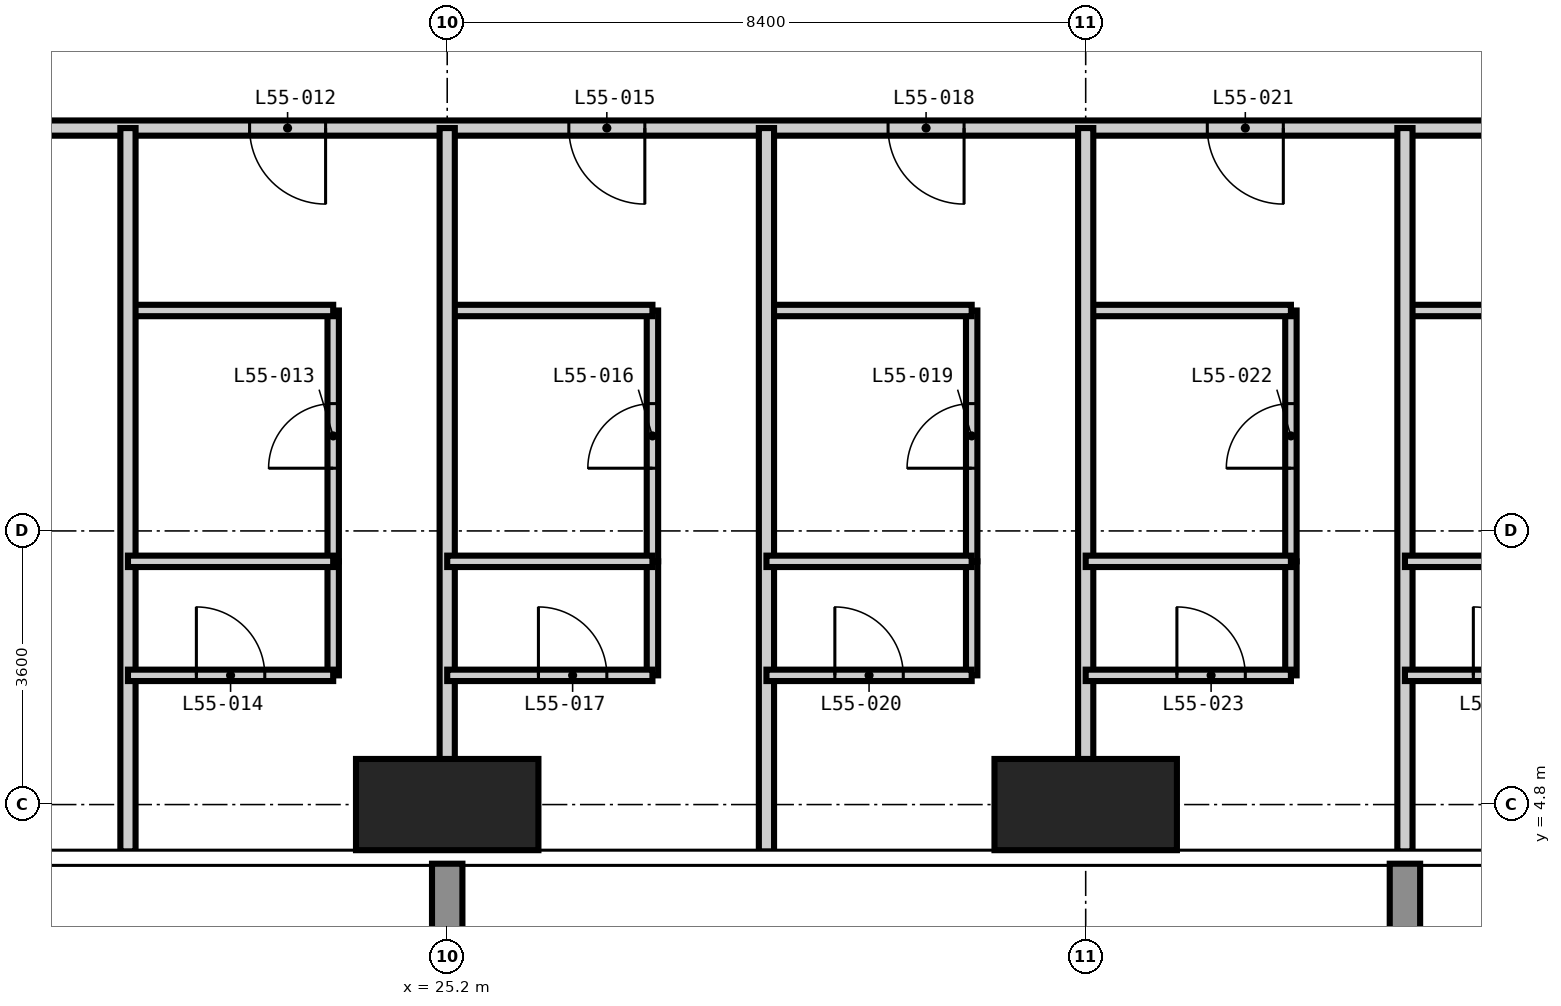
"""IFC4 building model, lengths in metres.
Left out: names, types, materials, properties, quantities, classifications, styles, units other than length and angle.
Written with IfcOpenShell. Run it as: python <this file> out.ifc"""

import sys

from ifc_helpers import new_model, si_unit, direction, frame, frame_2d, origin, origin_2d, place, context, subcontext, project, spatial, rectangle, extrude, element, fill, save


model = new_model("IFC4")
c1 = context("Model", 3, precision=1e-05, world=origin(), true_north=direction((0.0, 1.0)))
c2 = subcontext(c1, "Body", "Model", "MODEL_VIEW")
j1 = project(units=[si_unit("LENGTHUNIT", "METRE"), si_unit("PLANEANGLEUNIT", "RADIAN")], contexts=[c1])
p1 = place(None, origin())
s1 = spatial("IfcSite", under=j1, at=p1, CompositionType="ELEMENT")
p2 = place(p1, origin())
s2 = spatial("IfcBuilding", under=s1, at=p2, CompositionType="ELEMENT")
p3 = place(p2, frame((0.0, 0.0, 213.0)))
s3 = spatial("IfcBuildingStorey", under=s2, at=p3, CompositionType="ELEMENT", Elevation=213.0)
for number, where, z_axis, x_axis in (
    (1, (25.2, 4.8, -0.35), (0.0, 0.0, 1.0), (1.0, 0.0, 0.0)),
    (2, (33.6, 4.8, -0.35), (0.0, 0.0, 1.0), (1.0, 0.0, 0.0)),
):
    element("IfcColumn", number, at=place(p3, frame(where, z_axis=z_axis, x_axis=x_axis)), inside=s3, PredefinedType="COLUMN", context=c2, shape_type="SweptSolid", body=[
        extrude(rectangle(XDim=2.4, YDim=1.2, at=origin_2d()), origin(), (0.0, 0.0, 1.0), 3.6),
    ])
p4 = place(p3, frame((23.7, 8.0, 0.0), z_axis=(0.0, 0.0, 1.0), x_axis=(0.0, 1.0, 0.0)))
e3 = element("IfcWall", 3, at=p4, inside=s3, PredefinedType="PARTITIONING", context=c2, shape_type="SweptSolid", body=[
    extrude(rectangle(XDim=3.3, YDim=0.15, at=frame_2d((1.65, 0.0))), origin(), (0.0, 0.0, 1.0), 3.25),
])
p5 = place(p4, frame((1.225, 0.0, 0.0)))
e4 = element("IfcOpeningElement", 4, at=p5, cuts=e3, PredefinedType="OPENING", context=c2, shape_type="SweptSolid", body=[
    extrude(rectangle(XDim=0.85, YDim=2.1, at=frame_2d((0.425, 1.05))), frame((0.0, 0.085, 0.0), z_axis=(0.0, -1.0, 0.0), x_axis=(1.0, 0.0, 0.0)), (0.0, 0.0, 1.0), 0.17),
])
p6 = place(p3, frame((27.9, 8.0, 0.0), z_axis=(0.0, 0.0, 1.0), x_axis=(0.0, 1.0, 0.0)))
e5 = element("IfcWall", 5, at=p6, inside=s3, PredefinedType="PARTITIONING", context=c2, shape_type="SweptSolid", body=[
    extrude(rectangle(XDim=3.3, YDim=0.15, at=frame_2d((1.65, 0.0))), origin(), (0.0, 0.0, 1.0), 3.25),
])
p7 = place(p6, frame((1.225, 0.0, 0.0)))
e6 = element("IfcOpeningElement", 6, at=p7, cuts=e5, PredefinedType="OPENING", context=c2, shape_type="SweptSolid", body=[
    extrude(rectangle(XDim=0.85, YDim=2.1, at=frame_2d((0.425, 1.05))), frame((0.0, 0.085, 0.0), z_axis=(0.0, -1.0, 0.0), x_axis=(1.0, 0.0, 0.0)), (0.0, 0.0, 1.0), 0.17),
])
p8 = place(p3, frame((32.1, 8.0, 0.0), z_axis=(0.0, 0.0, 1.0), x_axis=(0.0, 1.0, 0.0)))
e7 = element("IfcWall", 7, at=p8, inside=s3, PredefinedType="PARTITIONING", context=c2, shape_type="SweptSolid", body=[
    extrude(rectangle(XDim=3.3, YDim=0.15, at=frame_2d((1.65, 0.0))), origin(), (0.0, 0.0, 1.0), 3.25),
])
p9 = place(p8, frame((1.225, 0.0, 0.0)))
e8 = element("IfcOpeningElement", 8, at=p9, cuts=e7, PredefinedType="OPENING", context=c2, shape_type="SweptSolid", body=[
    extrude(rectangle(XDim=0.85, YDim=2.1, at=frame_2d((0.425, 1.05))), frame((0.0, 0.085, 0.0), z_axis=(0.0, -1.0, 0.0), x_axis=(1.0, 0.0, 0.0)), (0.0, 0.0, 1.0), 0.17),
])
p10 = place(p3, frame((36.3, 8.0, 0.0), z_axis=(0.0, 0.0, 1.0), x_axis=(0.0, 1.0, 0.0)))
e9 = element("IfcWall", 9, at=p10, inside=s3, PredefinedType="PARTITIONING", context=c2, shape_type="SweptSolid", body=[
    extrude(rectangle(XDim=3.3, YDim=0.15, at=frame_2d((1.65, 0.0))), origin(), (0.0, 0.0, 1.0), 3.25),
])
p11 = place(p10, frame((1.225, 0.0, 0.0)))
e10 = element("IfcOpeningElement", 10, at=p11, cuts=e9, PredefinedType="OPENING", context=c2, shape_type="SweptSolid", body=[
    extrude(rectangle(XDim=0.85, YDim=2.1, at=frame_2d((0.425, 1.05))), frame((0.0, 0.085, 0.0), z_axis=(0.0, -1.0, 0.0), x_axis=(1.0, 0.0, 0.0)), (0.0, 0.0, 1.0), 0.17),
])
for number, where, z_axis, x_axis in (
    (11, (21.0, 11.3, 0.0), (0.0, 0.0, 1.0), (1.0, 0.0, 0.0)),
    (12, (25.2, 11.3, 0.0), (0.0, 0.0, 1.0), (1.0, 0.0, 0.0)),
):
    element("IfcWall", number, at=place(p3, frame(where, z_axis=z_axis, x_axis=x_axis)), inside=s3, PredefinedType="PARTITIONING", context=c2, shape_type="SweptSolid", body=[
        extrude(rectangle(XDim=2.7, YDim=0.15, at=frame_2d((1.35, 0.0))), origin(), (0.0, 0.0, 1.0), 3.25),
    ])
p12 = place(p3, frame((29.4, 11.3, 0.0), z_axis=(0.0, 0.0, 1.0), x_axis=(1.0, 0.0, 0.0)))
e13 = element("IfcWall", 13, at=p12, inside=s3, PredefinedType="PARTITIONING", context=c2, shape_type="SweptSolid", body=[
    extrude(rectangle(XDim=2.7, YDim=0.15, at=frame_2d((1.35, 0.0))), origin(), (0.0, 0.0, 1.0), 3.25),
])
for number, where, z_axis, x_axis in (
    (14, (33.6, 11.3, 0.0), (0.0, 0.0, 1.0), (1.0, 0.0, 0.0)),
    (15, (37.8, 11.3, 0.0), (0.0, 0.0, 1.0), (1.0, 0.0, 0.0)),
):
    element("IfcWall", number, at=place(p3, frame(where, z_axis=z_axis, x_axis=x_axis)), inside=s3, PredefinedType="PARTITIONING", context=c2, shape_type="SweptSolid", body=[
        extrude(rectangle(XDim=2.7, YDim=0.15, at=frame_2d((1.35, 0.0))), origin(), (0.0, 0.0, 1.0), 3.25),
    ])
p13 = place(p3, frame((45.7, 13.7, 0.0), z_axis=(0.0, 0.0, 1.0), x_axis=(-1.0, 0.0, 0.0)))
e16 = element("IfcWall", 16, at=p13, inside=s3, PredefinedType="PARTITIONING", context=c2, shape_type="SweptSolid", body=[
    extrude(rectangle(XDim=32.0, YDim=0.2, at=frame_2d((16.0, 0.0))), origin(), (0.0, 0.0, 1.0), 3.25),
])
p14 = place(p13, frame((26.3, 0.0, 0.0)))
e17 = element("IfcOpeningElement", 17, at=p14, cuts=e16, PredefinedType="OPENING", context=c2, shape_type="SweptSolid", body=[
    extrude(rectangle(XDim=1.0, YDim=2.2, at=frame_2d((0.5, 1.1))), frame((0.0, 0.11, 0.0), z_axis=(0.0, -1.0, 0.0), x_axis=(1.0, 0.0, 0.0)), (0.0, 0.0, 1.0), 0.22),
])
p15 = place(p13, frame((22.1, 0.0, 0.0)))
e18 = element("IfcOpeningElement", 18, at=p15, cuts=e16, PredefinedType="OPENING", context=c2, shape_type="SweptSolid", body=[
    extrude(rectangle(XDim=1.0, YDim=2.2, at=frame_2d((0.5, 1.1))), frame((0.0, 0.11, 0.0), z_axis=(0.0, -1.0, 0.0), x_axis=(1.0, 0.0, 0.0)), (0.0, 0.0, 1.0), 0.22),
])
p16 = place(p13, frame((17.9, 0.0, 0.0)))
e19 = element("IfcOpeningElement", 19, at=p16, cuts=e16, PredefinedType="OPENING", context=c2, shape_type="SweptSolid", body=[
    extrude(rectangle(XDim=1.0, YDim=2.2, at=frame_2d((0.5, 1.1))), frame((0.0, 0.11, 0.0), z_axis=(0.0, -1.0, 0.0), x_axis=(1.0, 0.0, 0.0)), (0.0, 0.0, 1.0), 0.22),
])
p17 = place(p13, frame((13.7, 0.0, 0.0)))
e20 = element("IfcOpeningElement", 20, at=p17, cuts=e16, PredefinedType="OPENING", context=c2, shape_type="SweptSolid", body=[
    extrude(rectangle(XDim=1.0, YDim=2.2, at=frame_2d((0.5, 1.1))), frame((0.0, 0.11, 0.0), z_axis=(0.0, -1.0, 0.0), x_axis=(1.0, 0.0, 0.0)), (0.0, 0.0, 1.0), 0.22),
])
p18 = place(p13, frame((9.5, 0.0, 0.0)))
e21 = element("IfcOpeningElement", 21, at=p18, cuts=e16, PredefinedType="OPENING", context=c2, shape_type="SweptSolid", body=[
    extrude(rectangle(XDim=1.0, YDim=2.2, at=frame_2d((0.5, 1.1))), frame((0.0, 0.11, 0.0), z_axis=(0.0, -1.0, 0.0), x_axis=(1.0, 0.0, 0.0)), (0.0, 0.0, 1.0), 0.22),
])
p19 = place(p13, frame((5.3, 0.0, 0.0)))
e22 = element("IfcOpeningElement", 22, at=p19, cuts=e16, PredefinedType="OPENING", context=c2, shape_type="SweptSolid", body=[
    extrude(rectangle(XDim=1.0, YDim=2.2, at=frame_2d((0.5, 1.1))), frame((0.0, 0.11, 0.0), z_axis=(0.0, -1.0, 0.0), x_axis=(1.0, 0.0, 0.0)), (0.0, 0.0, 1.0), 0.22),
])
for number, where, z_axis, x_axis in (
    (23, (21.0, 4.182, 0.0), (0.0, 0.0, 1.0), (0.0, 1.0, 0.0)),
    (24, (25.2, 4.182, 0.0), (0.0, 0.0, 1.0), (0.0, 1.0, 0.0)),
    (25, (29.4, 4.182, 0.0), (0.0, 0.0, 1.0), (0.0, 1.0, 0.0)),
    (26, (33.6, 4.182, 0.0), (0.0, 0.0, 1.0), (0.0, 1.0, 0.0)),
    (27, (37.8, 4.182, 0.0), (0.0, 0.0, 1.0), (0.0, 1.0, 0.0)),
):
    element("IfcWall", number, at=place(p3, frame(where, z_axis=z_axis, x_axis=x_axis)), inside=s3, PredefinedType="PARTITIONING", context=c2, shape_type="SweptSolid", body=[
        extrude(rectangle(XDim=9.518, YDim=0.2, at=frame_2d((4.759, 0.0))), origin(), (0.0, 0.0, 1.0), 3.25),
    ])
for number, where, z_axis, x_axis in (
    (28, (23.7, 6.5, 0.0), (0.0, 0.0, 1.0), (0.0, 1.0, 0.0)),
    (29, (27.9, 6.5, 0.0), (0.0, 0.0, 1.0), (0.0, 1.0, 0.0)),
    (30, (32.1, 6.5, 0.0), (0.0, 0.0, 1.0), (0.0, 1.0, 0.0)),
    (31, (36.3, 6.5, 0.0), (0.0, 0.0, 1.0), (0.0, 1.0, 0.0)),
):
    element("IfcWall", number, at=place(p3, frame(where, z_axis=z_axis, x_axis=x_axis)), inside=s3, PredefinedType="PARTITIONING", context=c2, shape_type="SweptSolid", body=[
        extrude(rectangle(XDim=1.5, YDim=0.15, at=frame_2d((0.75, 0.0))), origin(), (0.0, 0.0, 1.0), 3.25),
    ])
p20 = place(p3, frame((21.0, 6.5, 0.0), z_axis=(0.0, 0.0, 1.0), x_axis=(1.0, 0.0, 0.0)))
e32 = element("IfcWall", 32, at=p20, inside=s3, PredefinedType="PARTITIONING", context=c2, shape_type="SweptSolid", body=[
    extrude(rectangle(XDim=2.7, YDim=0.15, at=frame_2d((1.35, 0.0))), origin(), (0.0, 0.0, 1.0), 3.25),
])
p21 = place(p20, frame((0.9, 0.0, 0.0)))
e33 = element("IfcOpeningElement", 33, at=p21, cuts=e32, PredefinedType="OPENING", context=c2, shape_type="SweptSolid", body=[
    extrude(rectangle(XDim=0.9, YDim=2.1, at=frame_2d((0.45, 1.05))), frame((0.0, 0.085, 0.0), z_axis=(0.0, -1.0, 0.0), x_axis=(1.0, 0.0, 0.0)), (0.0, 0.0, 1.0), 0.17),
])
p22 = place(p3, frame((25.2, 6.5, 0.0), z_axis=(0.0, 0.0, 1.0), x_axis=(1.0, 0.0, 0.0)))
e34 = element("IfcWall", 34, at=p22, inside=s3, PredefinedType="PARTITIONING", context=c2, shape_type="SweptSolid", body=[
    extrude(rectangle(XDim=2.7, YDim=0.15, at=frame_2d((1.35, 0.0))), origin(), (0.0, 0.0, 1.0), 3.25),
])
p23 = place(p22, frame((1.2, 0.0, 0.0)))
e35 = element("IfcOpeningElement", 35, at=p23, cuts=e34, PredefinedType="OPENING", context=c2, shape_type="SweptSolid", body=[
    extrude(rectangle(XDim=0.9, YDim=2.1, at=frame_2d((0.45, 1.05))), frame((0.0, 0.085, 0.0), z_axis=(0.0, -1.0, 0.0), x_axis=(1.0, 0.0, 0.0)), (0.0, 0.0, 1.0), 0.17),
])
p24 = place(p3, frame((29.4, 6.5, 0.0), z_axis=(0.0, 0.0, 1.0), x_axis=(1.0, 0.0, 0.0)))
e36 = element("IfcWall", 36, at=p24, inside=s3, PredefinedType="PARTITIONING", context=c2, shape_type="SweptSolid", body=[
    extrude(rectangle(XDim=2.7, YDim=0.15, at=frame_2d((1.35, 0.0))), origin(), (0.0, 0.0, 1.0), 3.25),
])
p25 = place(p24, frame((0.9, 0.0, 0.0)))
e37 = element("IfcOpeningElement", 37, at=p25, cuts=e36, PredefinedType="OPENING", context=c2, shape_type="SweptSolid", body=[
    extrude(rectangle(XDim=0.9, YDim=2.1, at=frame_2d((0.45, 1.05))), frame((0.0, 0.085, 0.0), z_axis=(0.0, -1.0, 0.0), x_axis=(1.0, 0.0, 0.0)), (0.0, 0.0, 1.0), 0.17),
])
p26 = place(p3, frame((33.6, 6.5, 0.0), z_axis=(0.0, 0.0, 1.0), x_axis=(1.0, 0.0, 0.0)))
e38 = element("IfcWall", 38, at=p26, inside=s3, PredefinedType="PARTITIONING", context=c2, shape_type="SweptSolid", body=[
    extrude(rectangle(XDim=2.7, YDim=0.15, at=frame_2d((1.35, 0.0))), origin(), (0.0, 0.0, 1.0), 3.25),
])
p27 = place(p26, frame((1.2, 0.0, 0.0)))
e39 = element("IfcOpeningElement", 39, at=p27, cuts=e38, PredefinedType="OPENING", context=c2, shape_type="SweptSolid", body=[
    extrude(rectangle(XDim=0.9, YDim=2.1, at=frame_2d((0.45, 1.05))), frame((0.0, 0.085, 0.0), z_axis=(0.0, -1.0, 0.0), x_axis=(1.0, 0.0, 0.0)), (0.0, 0.0, 1.0), 0.17),
])
p28 = place(p3, frame((37.8, 6.5, 0.0), z_axis=(0.0, 0.0, 1.0), x_axis=(1.0, 0.0, 0.0)))
e40 = element("IfcWall", 40, at=p28, inside=s3, PredefinedType="PARTITIONING", context=c2, shape_type="SweptSolid", body=[
    extrude(rectangle(XDim=2.7, YDim=0.15, at=frame_2d((1.35, 0.0))), origin(), (0.0, 0.0, 1.0), 3.25),
])
p29 = place(p28, frame((0.9, 0.0, 0.0)))
e41 = element("IfcOpeningElement", 41, at=p29, cuts=e40, PredefinedType="OPENING", context=c2, shape_type="SweptSolid", body=[
    extrude(rectangle(XDim=0.9, YDim=2.1, at=frame_2d((0.45, 1.05))), frame((0.0, 0.085, 0.0), z_axis=(0.0, -1.0, 0.0), x_axis=(1.0, 0.0, 0.0)), (0.0, 0.0, 1.0), 0.17),
])
for number, where, z_axis, x_axis in (
    (42, (21.0, 8.0, 0.0), (0.0, 0.0, 1.0), (1.0, 0.0, 0.0)),
    (43, (25.2, 8.0, 0.0), (0.0, 0.0, 1.0), (1.0, 0.0, 0.0)),
):
    element("IfcWall", number, at=place(p3, frame(where, z_axis=z_axis, x_axis=x_axis)), inside=s3, PredefinedType="PARTITIONING", context=c2, shape_type="SweptSolid", body=[
        extrude(rectangle(XDim=2.7, YDim=0.15, at=frame_2d((1.35, 0.0))), origin(), (0.0, 0.0, 1.0), 3.25),
    ])
p30 = place(p3, frame((29.4, 8.0, 0.0), z_axis=(0.0, 0.0, 1.0), x_axis=(1.0, 0.0, 0.0)))
e44 = element("IfcWall", 44, at=p30, inside=s3, PredefinedType="PARTITIONING", context=c2, shape_type="SweptSolid", body=[
    extrude(rectangle(XDim=2.7, YDim=0.15, at=frame_2d((1.35, 0.0))), origin(), (0.0, 0.0, 1.0), 3.25),
])
for number, where, z_axis, x_axis in (
    (45, (33.6, 8.0, 0.0), (0.0, 0.0, 1.0), (1.0, 0.0, 0.0)),
    (46, (37.8, 8.0, 0.0), (0.0, 0.0, 1.0), (1.0, 0.0, 0.0)),
):
    element("IfcWall", number, at=place(p3, frame(where, z_axis=z_axis, x_axis=x_axis)), inside=s3, PredefinedType="PARTITIONING", context=c2, shape_type="SweptSolid", body=[
        extrude(rectangle(XDim=2.7, YDim=0.15, at=frame_2d((1.35, 0.0))), origin(), (0.0, 0.0, 1.0), 3.25),
    ])
p31 = place(p15, origin())
e47 = element("IfcDoor", 47, at=p31, inside=s3, OperationType="SINGLE_SWING_LEFT", PredefinedType="DOOR", context=c2, shape_type="SweptSolid", body=[
    extrude(rectangle(XDim=1.0, YDim=2.2, at=frame_2d((0.5, 1.1))), frame((0.0, 0.025, 0.0), z_axis=(0.0, -1.0, 0.0), x_axis=(1.0, 0.0, 0.0)), (0.0, 0.0, 1.0), 0.05),
])
fill(e18, e47)
p32 = place(p5, origin())
e48 = element("IfcDoor", 48, at=p32, inside=s3, OperationType="SINGLE_SWING_LEFT", PredefinedType="DOOR", context=c2, shape_type="SweptSolid", body=[
    extrude(rectangle(XDim=0.85, YDim=2.1, at=frame_2d((0.425, 1.05))), frame((0.0, 0.025, 0.0), z_axis=(0.0, -1.0, 0.0), x_axis=(1.0, 0.0, 0.0)), (0.0, 0.0, 1.0), 0.05),
])
fill(e4, e48)
p33 = place(p21, origin())
e49 = element("IfcDoor", 49, at=p33, inside=s3, OperationType="SINGLE_SWING_LEFT", PredefinedType="DOOR", context=c2, shape_type="SweptSolid", body=[
    extrude(rectangle(XDim=0.9, YDim=2.1, at=frame_2d((0.45, 1.05))), frame((0.0, 0.025, 0.0), z_axis=(0.0, -1.0, 0.0), x_axis=(1.0, 0.0, 0.0)), (0.0, 0.0, 1.0), 0.05),
])
fill(e33, e49)
p34 = place(p16, origin())
e50 = element("IfcDoor", 50, at=p34, inside=s3, OperationType="SINGLE_SWING_LEFT", PredefinedType="DOOR", context=c2, shape_type="SweptSolid", body=[
    extrude(rectangle(XDim=1.0, YDim=2.2, at=frame_2d((0.5, 1.1))), frame((0.0, 0.025, 0.0), z_axis=(0.0, -1.0, 0.0), x_axis=(1.0, 0.0, 0.0)), (0.0, 0.0, 1.0), 0.05),
])
fill(e19, e50)
p35 = place(p7, origin())
e51 = element("IfcDoor", 51, at=p35, inside=s3, OperationType="SINGLE_SWING_LEFT", PredefinedType="DOOR", context=c2, shape_type="SweptSolid", body=[
    extrude(rectangle(XDim=0.85, YDim=2.1, at=frame_2d((0.425, 1.05))), frame((0.0, 0.025, 0.0), z_axis=(0.0, -1.0, 0.0), x_axis=(1.0, 0.0, 0.0)), (0.0, 0.0, 1.0), 0.05),
])
fill(e6, e51)
p36 = place(p23, origin())
e52 = element("IfcDoor", 52, at=p36, inside=s3, OperationType="SINGLE_SWING_LEFT", PredefinedType="DOOR", context=c2, shape_type="SweptSolid", body=[
    extrude(rectangle(XDim=0.9, YDim=2.1, at=frame_2d((0.45, 1.05))), frame((0.0, 0.025, 0.0), z_axis=(0.0, -1.0, 0.0), x_axis=(1.0, 0.0, 0.0)), (0.0, 0.0, 1.0), 0.05),
])
fill(e35, e52)
p37 = place(p17, origin())
e53 = element("IfcDoor", 53, at=p37, inside=s3, OperationType="SINGLE_SWING_LEFT", PredefinedType="DOOR", context=c2, shape_type="SweptSolid", body=[
    extrude(rectangle(XDim=1.0, YDim=2.2, at=frame_2d((0.5, 1.1))), frame((0.0, 0.025, 0.0), z_axis=(0.0, -1.0, 0.0), x_axis=(1.0, 0.0, 0.0)), (0.0, 0.0, 1.0), 0.05),
])
fill(e20, e53)
p38 = place(p9, origin())
e54 = element("IfcDoor", 54, at=p38, inside=s3, OperationType="SINGLE_SWING_LEFT", PredefinedType="DOOR", context=c2, shape_type="SweptSolid", body=[
    extrude(rectangle(XDim=0.85, YDim=2.1, at=frame_2d((0.425, 1.05))), frame((0.0, 0.025, 0.0), z_axis=(0.0, -1.0, 0.0), x_axis=(1.0, 0.0, 0.0)), (0.0, 0.0, 1.0), 0.05),
])
fill(e8, e54)
p39 = place(p25, origin())
e55 = element("IfcDoor", 55, at=p39, inside=s3, OperationType="SINGLE_SWING_LEFT", PredefinedType="DOOR", context=c2, shape_type="SweptSolid", body=[
    extrude(rectangle(XDim=0.9, YDim=2.1, at=frame_2d((0.45, 1.05))), frame((0.0, 0.025, 0.0), z_axis=(0.0, -1.0, 0.0), x_axis=(1.0, 0.0, 0.0)), (0.0, 0.0, 1.0), 0.05),
])
fill(e37, e55)
p40 = place(p18, origin())
e56 = element("IfcDoor", 56, at=p40, inside=s3, OperationType="SINGLE_SWING_LEFT", PredefinedType="DOOR", context=c2, shape_type="SweptSolid", body=[
    extrude(rectangle(XDim=1.0, YDim=2.2, at=frame_2d((0.5, 1.1))), frame((0.0, 0.025, 0.0), z_axis=(0.0, -1.0, 0.0), x_axis=(1.0, 0.0, 0.0)), (0.0, 0.0, 1.0), 0.05),
])
fill(e21, e56)
p41 = place(p11, origin())
e57 = element("IfcDoor", 57, at=p41, inside=s3, OperationType="SINGLE_SWING_LEFT", PredefinedType="DOOR", context=c2, shape_type="SweptSolid", body=[
    extrude(rectangle(XDim=0.85, YDim=2.1, at=frame_2d((0.425, 1.05))), frame((0.0, 0.025, 0.0), z_axis=(0.0, -1.0, 0.0), x_axis=(1.0, 0.0, 0.0)), (0.0, 0.0, 1.0), 0.05),
])
fill(e10, e57)
p42 = place(p27, origin())
e58 = element("IfcDoor", 58, at=p42, inside=s3, OperationType="SINGLE_SWING_LEFT", PredefinedType="DOOR", context=c2, shape_type="SweptSolid", body=[
    extrude(rectangle(XDim=0.9, YDim=2.1, at=frame_2d((0.45, 1.05))), frame((0.0, 0.025, 0.0), z_axis=(0.0, -1.0, 0.0), x_axis=(1.0, 0.0, 0.0)), (0.0, 0.0, 1.0), 0.05),
])
fill(e39, e58)
p43 = place(p29, origin())
e59 = element("IfcDoor", 59, at=p43, inside=s3, OperationType="SINGLE_SWING_LEFT", PredefinedType="DOOR", context=c2, shape_type="SweptSolid", body=[
    extrude(rectangle(XDim=0.9, YDim=2.1, at=frame_2d((0.45, 1.05))), frame((0.0, 0.025, 0.0), z_axis=(0.0, -1.0, 0.0), x_axis=(1.0, 0.0, 0.0)), (0.0, 0.0, 1.0), 0.05),
])
fill(e41, e59)
save(model, sys.argv[1])
